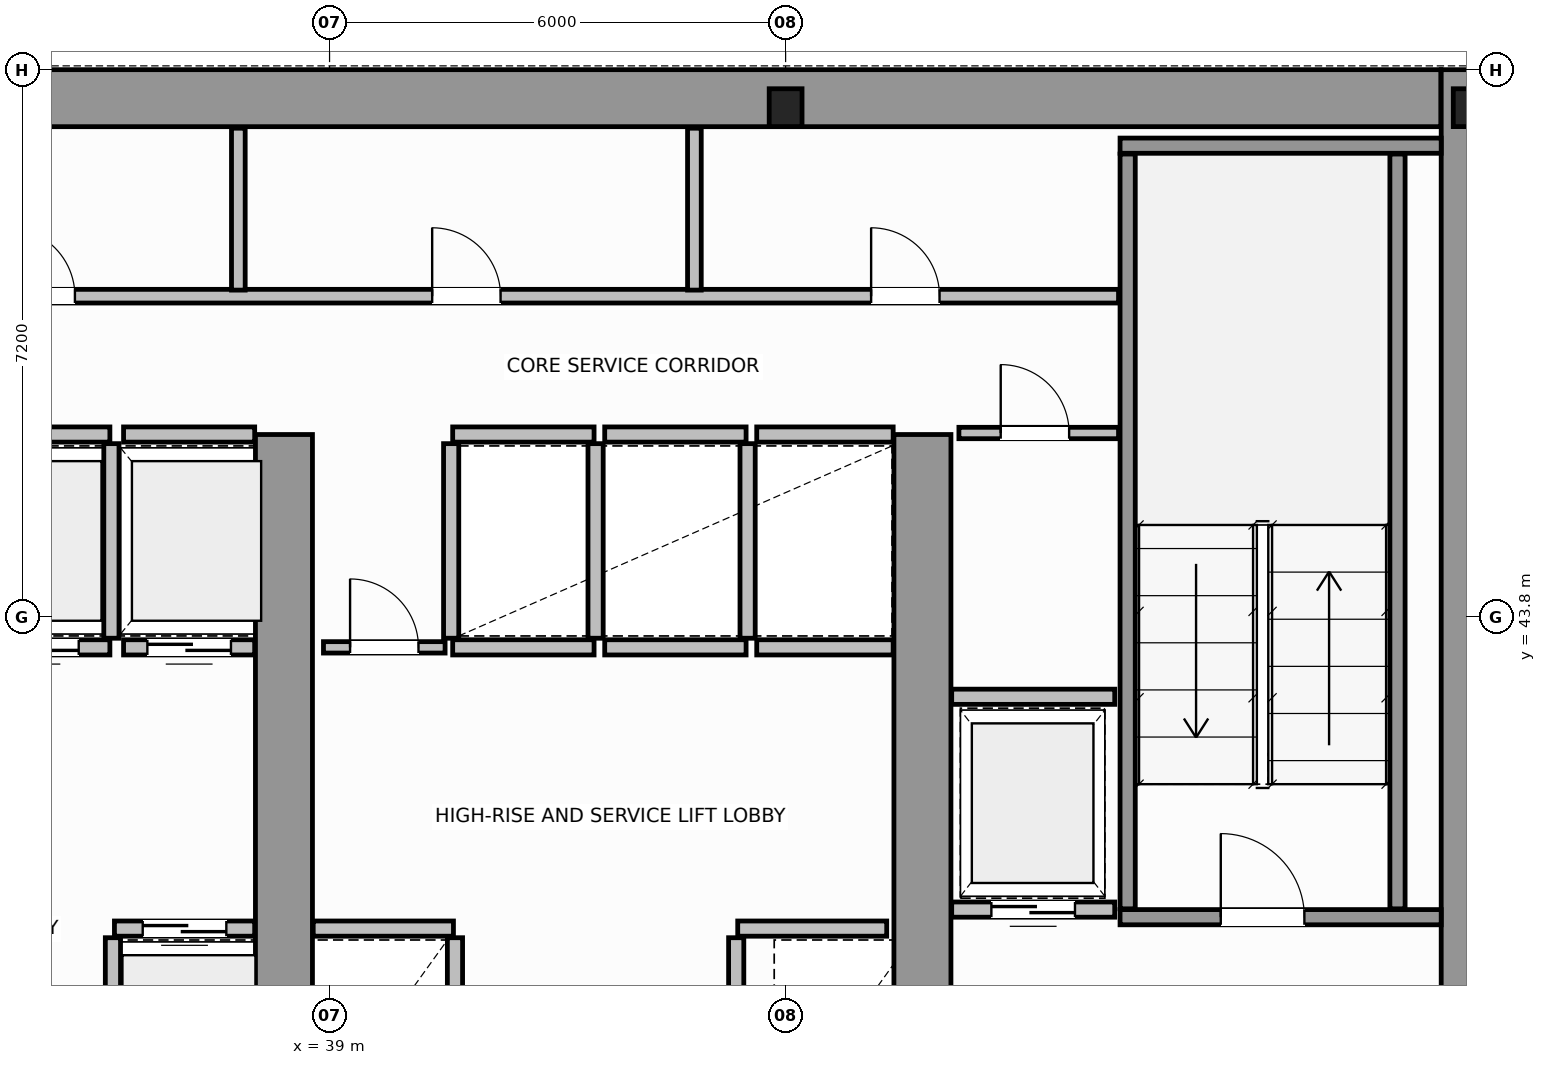
"""IFC4 building model, lengths in metres.
Left out: names, types, materials, properties, quantities, classifications, styles, units other than length and angle.
Written with IfcOpenShell. Run it as: python <this file> out.ifc"""

import sys

from ifc_helpers import new_model, si_unit, direction, frame, frame_2d, origin, origin_2d, place, context, subcontext, project, spatial, rectangle, i_section, extrude, source, transform, mapped, element, fill, save


model = new_model("IFC4")
c1 = context("Model", 3, precision=1e-05, world=origin(), true_north=direction((0.0, 1.0)))
c2 = subcontext(c1, "Body", "Model", "MODEL_VIEW")
j1 = project(units=[si_unit("LENGTHUNIT", "METRE"), si_unit("PLANEANGLEUNIT", "RADIAN")], contexts=[c1])
p1 = place(None, origin())
s1 = spatial("IfcSite", under=j1, at=p1, CompositionType="ELEMENT")
p2 = place(p1, origin())
s2 = spatial("IfcBuilding", under=s1, at=p2, CompositionType="ELEMENT")
p3 = place(p2, frame((0.0, 0.0, 141.4)))
s3 = spatial("IfcBuildingStorey", under=s2, at=p3, CompositionType="ELEMENT", Elevation=141.4)
m1 = source(origin(), c2, "Body", "SweptSolid", [
    extrude(i_section(OverallWidth=0.432, OverallDepth=0.498, WebThickness=0.055, FlangeThickness=0.068, FilletRadius=0.015, at=origin_2d()), origin(), (0.0, 0.0, 1.0), 3.8),
])
for number, where, z_axis, x_axis in (
    (1, (45.0, 50.5, 0.0), (0.0, 0.0, 1.0), (1.0, 0.0, 0.0)),
    (2, (54.0, 50.5, 0.0), (0.0, 0.0, 1.0), (1.0, 0.0, 0.0)),
):
    element("IfcColumn", number, at=place(p3, frame(where, z_axis=z_axis, x_axis=x_axis)), inside=s3, PredefinedType="COLUMN", context=c2, shape_type="MappedRepresentation", body=[
        mapped(m1, transform((0.0, 0.0, 0.0), scale=1.0)),
    ])
p4 = place(p3, frame((34.002, 50.625, 0.0), z_axis=(0.0, 0.0, 1.0), x_axis=(1.0, 0.0, 0.0)))
e3 = element("IfcWall", 3, at=p4, inside=s3, PredefinedType="SHEAR", context=c2, shape_type="SweptSolid", body=[
    extrude(rectangle(XDim=19.619, YDim=0.75, at=frame_2d((9.81, 0.0))), origin(), (0.0, 0.0, 1.0), 3.8),
])
p5 = place(p3, frame((54.0, 36.5, 0.0), z_axis=(0.0, 0.0, 1.0), x_axis=(0.0, 1.0, 0.0)))
e4 = element("IfcWall", 4, at=p5, inside=s3, PredefinedType="SHEAR", context=c2, shape_type="SweptSolid", body=[
    extrude(rectangle(XDim=14.5, YDim=0.75, at=frame_2d((7.25, 0.0))), origin(), (0.0, 0.0, 1.0), 3.8),
])
for number, where, z_axis, x_axis in (
    (5, (38.4, 36.895, 0.0), (0.0, 0.0, 1.0), (0.0, 1.0, 0.0)),
    (6, (46.8, 36.895, 0.0), (0.0, 0.0, 1.0), (0.0, 1.0, 0.0)),
):
    element("IfcWall", number, at=place(p3, frame(where, z_axis=z_axis, x_axis=x_axis)), inside=s3, PredefinedType="SHEAR", context=c2, shape_type="SweptSolid", body=[
        extrude(rectangle(XDim=9.305, YDim=0.75, at=frame_2d((4.652, 0.0))), origin(), (0.0, 0.0, 1.0), 3.8),
    ])
p6 = place(p3, frame((49.4, 39.85, 0.0), z_axis=(0.0, 0.0, 1.0), x_axis=(1.0, 0.0, 0.0)))
e7 = element("IfcWall", 7, at=p6, inside=s3, PredefinedType="SOLIDWALL", context=c2, shape_type="SweptSolid", body=[
    extrude(rectangle(XDim=4.225, YDim=0.2, at=frame_2d((2.113, 0.0))), origin(), (0.0, 0.0, 1.0), 3.8),
])
p7 = place(p6, frame((1.325, 0.0, 0.0)))
e8 = element("IfcOpeningElement", 8, at=p7, cuts=e7, PredefinedType="OPENING", context=c2, shape_type="SweptSolid", body=[
    extrude(rectangle(XDim=1.1, YDim=2.15, at=frame_2d((0.55, 1.075))), frame((0.0, 0.11, 0.0), z_axis=(0.0, -1.0, 0.0), x_axis=(1.0, 0.0, 0.0)), (0.0, 0.0, 1.0), 0.22),
])
p8 = place(p3, frame((49.4, 50.0, 0.0), z_axis=(0.0, 0.0, 1.0), x_axis=(1.0, 0.0, 0.0)))
e9 = element("IfcWall", 9, at=p8, inside=s3, PredefinedType="SOLIDWALL", context=c2, shape_type="SweptSolid", body=[
    extrude(rectangle(XDim=4.225, YDim=0.2, at=frame_2d((2.113, 0.0))), origin(), (0.0, 0.0, 1.0), 3.8),
])
for number, where, z_axis, x_axis in (
    (10, (49.5, 39.96, 0.0), (0.0, 0.0, 1.0), (0.0, 1.0, 0.0)),
    (11, (53.05, 39.96, 0.0), (0.0, 0.0, 1.0), (0.0, 1.0, 0.0)),
):
    element("IfcWall", number, at=place(p3, frame(where, z_axis=z_axis, x_axis=x_axis)), inside=s3, PredefinedType="SOLIDWALL", context=c2, shape_type="SweptSolid", body=[
        extrude(rectangle(XDim=9.93, YDim=0.2, at=frame_2d((4.965, 0.0))), origin(), (0.0, 0.0, 1.0), 3.8),
    ])
p9 = place(p3, frame((36.17, 39.7, 0.0), z_axis=(0.0, 0.0, 1.0), x_axis=(1.0, 0.0, 0.0)))
e12 = element("IfcWall", 12, at=p9, inside=s3, PredefinedType="SOLIDWALL", context=c2, shape_type="SweptSolid", body=[
    extrude(rectangle(XDim=1.845, YDim=0.2, at=frame_2d((0.922, 0.0))), origin(), (0.0, 0.0, 1.0), 3.58),
])
p10 = place(p9, frame((0.372, 0.0, 0.0)))
e13 = element("IfcOpeningElement", 13, at=p10, cuts=e12, PredefinedType="OPENING", context=c2, shape_type="SweptSolid", body=[
    extrude(rectangle(XDim=1.1, YDim=2.15, at=frame_2d((0.55, 1.075))), frame((0.0, 0.11, 0.0), z_axis=(0.0, -1.0, 0.0), x_axis=(1.0, 0.0, 0.0)), (0.0, 0.0, 1.0), 0.22),
])
p11 = place(p3, frame((36.15, 37.02, 0.0), z_axis=(0.0, 0.0, 1.0), x_axis=(0.0, 1.0, 0.0)))
e14 = element("IfcWall", 14, at=p11, inside=s3, PredefinedType="SOLIDWALL", context=c2, shape_type="SweptSolid", body=[
    extrude(rectangle(XDim=2.56, YDim=0.2, at=frame_2d((1.28, 0.0))), origin(), (0.0, 0.0, 1.0), 3.58),
])
p12 = place(p3, frame((34.19, 43.4, 0.0), z_axis=(0.0, 0.0, 1.0), x_axis=(1.0, 0.0, 0.0)))
e15 = element("IfcWall", 15, at=p12, inside=s3, PredefinedType="SOLIDWALL", context=c2, shape_type="SweptSolid", body=[
    extrude(rectangle(XDim=1.92, YDim=0.2, at=frame_2d((0.96, 0.0))), origin(), (0.0, 0.0, 1.0), 3.58),
])
p13 = place(p12, frame((0.41, 0.0, 0.0)))
e16 = element("IfcOpeningElement", 16, at=p13, cuts=e15, PredefinedType="OPENING", context=c2, shape_type="SweptSolid", body=[
    extrude(rectangle(XDim=1.1, YDim=2.15, at=frame_2d((0.55, 1.075))), frame((0.0, 0.11, 0.0), z_axis=(0.0, -1.0, 0.0), x_axis=(1.0, 0.0, 0.0)), (0.0, 0.0, 1.0), 0.22),
])
p14 = place(p3, frame((34.19, 46.2, 0.0), z_axis=(0.0, 0.0, 1.0), x_axis=(1.0, 0.0, 0.0)))
e17 = element("IfcWall", 17, at=p14, inside=s3, PredefinedType="SOLIDWALL", context=c2, shape_type="SweptSolid", body=[
    extrude(rectangle(XDim=1.92, YDim=0.2, at=frame_2d((0.96, 0.0))), origin(), (0.0, 0.0, 1.0), 3.58),
])
p15 = place(p3, frame((36.13, 43.52, 0.0), z_axis=(0.0, 0.0, 1.0), x_axis=(0.0, 1.0, 0.0)))
e18 = element("IfcWall", 18, at=p15, inside=s3, PredefinedType="SOLIDWALL", context=c2, shape_type="SweptSolid", body=[
    extrude(rectangle(XDim=2.56, YDim=0.2, at=frame_2d((1.28, 0.0))), origin(), (0.0, 0.0, 1.0), 3.58),
])
p16 = place(p3, frame((36.29, 43.4, 0.0), z_axis=(0.0, 0.0, 1.0), x_axis=(1.0, 0.0, 0.0)))
e19 = element("IfcWall", 19, at=p16, inside=s3, PredefinedType="SOLIDWALL", context=c2, shape_type="SweptSolid", body=[
    extrude(rectangle(XDim=1.725, YDim=0.2, at=frame_2d((0.862, 0.0))), origin(), (0.0, 0.0, 1.0), 3.58),
])
p17 = place(p16, frame((0.313, 0.0, 0.0)))
e20 = element("IfcOpeningElement", 20, at=p17, cuts=e19, PredefinedType="OPENING", context=c2, shape_type="SweptSolid", body=[
    extrude(rectangle(XDim=1.1, YDim=2.15, at=frame_2d((0.55, 1.075))), frame((0.0, 0.11, 0.0), z_axis=(0.0, -1.0, 0.0), x_axis=(1.0, 0.0, 0.0)), (0.0, 0.0, 1.0), 0.22),
])
p18 = place(p3, frame((36.29, 46.2, 0.0), z_axis=(0.0, 0.0, 1.0), x_axis=(1.0, 0.0, 0.0)))
e21 = element("IfcWall", 21, at=p18, inside=s3, PredefinedType="SOLIDWALL", context=c2, shape_type="SweptSolid", body=[
    extrude(rectangle(XDim=1.725, YDim=0.2, at=frame_2d((0.862, 0.0))), origin(), (0.0, 0.0, 1.0), 3.58),
])
p19 = place(p3, frame((38.785, 39.7, 0.0), z_axis=(0.0, 0.0, 1.0), x_axis=(1.0, 0.0, 0.0)))
e22 = element("IfcWall", 22, at=p19, inside=s3, PredefinedType="SOLIDWALL", context=c2, shape_type="SweptSolid", body=[
    extrude(rectangle(XDim=1.845, YDim=0.2, at=frame_2d((0.922, 0.0))), origin(), (0.0, 0.0, 1.0), 3.58),
])
p20 = place(p3, frame((40.65, 37.02, 0.0), z_axis=(0.0, 0.0, 1.0), x_axis=(0.0, 1.0, 0.0)))
e23 = element("IfcWall", 23, at=p20, inside=s3, PredefinedType="SOLIDWALL", context=c2, shape_type="SweptSolid", body=[
    extrude(rectangle(XDim=2.56, YDim=0.2, at=frame_2d((1.28, 0.0))), origin(), (0.0, 0.0, 1.0), 3.58),
])
p21 = place(p3, frame((44.37, 39.7, 0.0), z_axis=(0.0, 0.0, 1.0), x_axis=(1.0, 0.0, 0.0)))
e24 = element("IfcWall", 24, at=p21, inside=s3, PredefinedType="SOLIDWALL", context=c2, shape_type="SweptSolid", body=[
    extrude(rectangle(XDim=1.96, YDim=0.2, at=frame_2d((0.98, 0.0))), origin(), (0.0, 0.0, 1.0), 3.58),
])
p22 = place(p3, frame((44.35, 37.02, 0.0), z_axis=(0.0, 0.0, 1.0), x_axis=(0.0, 1.0, 0.0)))
e25 = element("IfcWall", 25, at=p22, inside=s3, PredefinedType="SOLIDWALL", context=c2, shape_type="SweptSolid", body=[
    extrude(rectangle(XDim=2.56, YDim=0.2, at=frame_2d((1.28, 0.0))), origin(), (0.0, 0.0, 1.0), 3.58),
])
for number, where, z_axis, x_axis in (
    (26, (40.62, 43.4, 0.0), (0.0, 0.0, 1.0), (1.0, 0.0, 0.0)),
    (27, (40.62, 46.2, 0.0), (0.0, 0.0, 1.0), (1.0, 0.0, 0.0)),
):
    element("IfcWall", number, at=place(p3, frame(where, z_axis=z_axis, x_axis=x_axis)), inside=s3, PredefinedType="SOLIDWALL", context=c2, shape_type="SweptSolid", body=[
        extrude(rectangle(XDim=1.86, YDim=0.2, at=frame_2d((0.93, 0.0))), origin(), (0.0, 0.0, 1.0), 3.58),
    ])
for number, where, z_axis, x_axis in (
    (28, (40.6, 43.52, 0.0), (0.0, 0.0, 1.0), (0.0, 1.0, 0.0)),
    (29, (42.5, 43.52, 0.0), (0.0, 0.0, 1.0), (0.0, 1.0, 0.0)),
):
    element("IfcWall", number, at=place(p3, frame(where, z_axis=z_axis, x_axis=x_axis)), inside=s3, PredefinedType="SOLIDWALL", context=c2, shape_type="SweptSolid", body=[
        extrude(rectangle(XDim=2.56, YDim=0.2, at=frame_2d((1.28, 0.0))), origin(), (0.0, 0.0, 1.0), 3.58),
    ])
for number, where, z_axis, x_axis in (
    (30, (42.62, 43.4, 0.0), (0.0, 0.0, 1.0), (1.0, 0.0, 0.0)),
    (31, (42.62, 46.2, 0.0), (0.0, 0.0, 1.0), (1.0, 0.0, 0.0)),
):
    element("IfcWall", number, at=place(p3, frame(where, z_axis=z_axis, x_axis=x_axis)), inside=s3, PredefinedType="SOLIDWALL", context=c2, shape_type="SweptSolid", body=[
        extrude(rectangle(XDim=1.86, YDim=0.2, at=frame_2d((0.93, 0.0))), origin(), (0.0, 0.0, 1.0), 3.58),
    ])
p23 = place(p3, frame((44.5, 43.52, 0.0), z_axis=(0.0, 0.0, 1.0), x_axis=(0.0, 1.0, 0.0)))
e32 = element("IfcWall", 32, at=p23, inside=s3, PredefinedType="SOLIDWALL", context=c2, shape_type="SweptSolid", body=[
    extrude(rectangle(XDim=2.56, YDim=0.2, at=frame_2d((1.28, 0.0))), origin(), (0.0, 0.0, 1.0), 3.58),
])
for number, where, z_axis, x_axis in (
    (33, (44.62, 43.4, 0.0), (0.0, 0.0, 1.0), (1.0, 0.0, 0.0)),
    (34, (44.62, 46.2, 0.0), (0.0, 0.0, 1.0), (1.0, 0.0, 0.0)),
):
    element("IfcWall", number, at=place(p3, frame(where, z_axis=z_axis, x_axis=x_axis)), inside=s3, PredefinedType="SOLIDWALL", context=c2, shape_type="SweptSolid", body=[
        extrude(rectangle(XDim=1.795, YDim=0.2, at=frame_2d((0.897, 0.0))), origin(), (0.0, 0.0, 1.0), 3.58),
    ])
p24 = place(p3, frame((47.185, 39.95, 0.0), z_axis=(0.0, 0.0, 1.0), x_axis=(1.0, 0.0, 0.0)))
e35 = element("IfcWall", 35, at=p24, inside=s3, PredefinedType="SOLIDWALL", context=c2, shape_type="SweptSolid", body=[
    extrude(rectangle(XDim=2.145, YDim=0.2, at=frame_2d((1.073, 0.0))), origin(), (0.0, 0.0, 1.0), 3.58),
])
p25 = place(p24, frame((0.522, 0.0, 0.0)))
e36 = element("IfcOpeningElement", 36, at=p25, cuts=e35, PredefinedType="OPENING", context=c2, shape_type="SweptSolid", body=[
    extrude(rectangle(XDim=1.1, YDim=2.15, at=frame_2d((0.55, 1.075))), frame((0.0, 0.11, 0.0), z_axis=(0.0, -1.0, 0.0), x_axis=(1.0, 0.0, 0.0)), (0.0, 0.0, 1.0), 0.22),
])
p26 = place(p3, frame((47.185, 42.75, 0.0), z_axis=(0.0, 0.0, 1.0), x_axis=(1.0, 0.0, 0.0)))
e37 = element("IfcWall", 37, at=p26, inside=s3, PredefinedType="SOLIDWALL", context=c2, shape_type="SweptSolid", body=[
    extrude(rectangle(XDim=2.145, YDim=0.2, at=frame_2d((1.073, 0.0))), origin(), (0.0, 0.0, 1.0), 3.58),
])
p27 = place(p3, frame((47.28, 46.22, 0.0), z_axis=(0.0, 0.0, 1.0), x_axis=(1.0, 0.0, 0.0)))
e38 = element("IfcWall", 38, at=p27, inside=s3, PredefinedType="PARTITIONING", context=c2, shape_type="SweptSolid", body=[
    extrude(rectangle(XDim=2.1, YDim=0.15, at=frame_2d((1.05, 0.0))), origin(), (0.0, 0.0, 1.0), 3.58),
])
p28 = place(p27, frame((0.55, 0.0, 0.0)))
e39 = element("IfcOpeningElement", 39, at=p28, cuts=e38, PredefinedType="OPENING", context=c2, shape_type="SweptSolid", body=[
    extrude(rectangle(XDim=0.9, YDim=2.1, at=frame_2d((0.45, 1.05))), frame((0.0, 0.085, 0.0), z_axis=(0.0, -1.0, 0.0), x_axis=(1.0, 0.0, 0.0)), (0.0, 0.0, 1.0), 0.17),
])
p29 = place(p3, frame((38.92, 43.4, 0.0), z_axis=(0.0, 0.0, 1.0), x_axis=(1.0, 0.0, 0.0)))
e40 = element("IfcWall", 40, at=p29, inside=s3, PredefinedType="PARTITIONING", context=c2, shape_type="SweptSolid", body=[
    extrude(rectangle(XDim=1.6, YDim=0.15, at=frame_2d((0.8, 0.0))), origin(), (0.0, 0.0, 1.0), 3.58),
])
p30 = place(p29, frame((0.35, 0.0, 0.0)))
e41 = element("IfcOpeningElement", 41, at=p30, cuts=e40, PredefinedType="OPENING", context=c2, shape_type="SweptSolid", body=[
    extrude(rectangle(XDim=0.9, YDim=2.1, at=frame_2d((0.45, 1.05))), frame((0.0, 0.085, 0.0), z_axis=(0.0, -1.0, 0.0), x_axis=(1.0, 0.0, 0.0)), (0.0, 0.0, 1.0), 0.17),
])
p31 = place(p3, frame((18.62, 48.02, 0.0), z_axis=(0.0, 0.0, 1.0), x_axis=(1.0, 0.0, 0.0)))
e42 = element("IfcWall", 42, at=p31, inside=s3, PredefinedType="PLUMBINGWALL", context=c2, shape_type="SweptSolid", body=[
    extrude(rectangle(XDim=30.76, YDim=0.18, at=frame_2d((15.38, 0.0))), origin(), (0.0, 0.0, 1.0), 3.58),
])
p32 = place(p31, frame((1.655, 0.0, 0.0)))
e43 = element("IfcOpeningElement", 43, at=p32, cuts=e42, PredefinedType="OPENING", context=c2, shape_type="SweptSolid", body=[
    extrude(rectangle(XDim=0.9, YDim=2.15, at=frame_2d((0.45, 1.075))), frame((0.0, 0.1, 0.0), z_axis=(0.0, -1.0, 0.0), x_axis=(1.0, 0.0, 0.0)), (0.0, 0.0, 1.0), 0.2),
])
p33 = place(p31, frame((6.03, 0.0, 0.0)))
e44 = element("IfcOpeningElement", 44, at=p33, cuts=e42, PredefinedType="OPENING", context=c2, shape_type="SweptSolid", body=[
    extrude(rectangle(XDim=0.9, YDim=2.15, at=frame_2d((0.45, 1.075))), frame((0.0, 0.1, 0.0), z_axis=(0.0, -1.0, 0.0), x_axis=(1.0, 0.0, 0.0)), (0.0, 0.0, 1.0), 0.2),
])
p34 = place(p31, frame((10.93, 0.0, 0.0)))
e45 = element("IfcOpeningElement", 45, at=p34, cuts=e42, PredefinedType="OPENING", context=c2, shape_type="SweptSolid", body=[
    extrude(rectangle(XDim=0.9, YDim=2.15, at=frame_2d((0.45, 1.075))), frame((0.0, 0.1, 0.0), z_axis=(0.0, -1.0, 0.0), x_axis=(1.0, 0.0, 0.0)), (0.0, 0.0, 1.0), 0.2),
])
p35 = place(p31, frame((16.13, 0.0, 0.0)))
e46 = element("IfcOpeningElement", 46, at=p35, cuts=e42, PredefinedType="OPENING", context=c2, shape_type="SweptSolid", body=[
    extrude(rectangle(XDim=0.9, YDim=2.15, at=frame_2d((0.45, 1.075))), frame((0.0, 0.1, 0.0), z_axis=(0.0, -1.0, 0.0), x_axis=(1.0, 0.0, 0.0)), (0.0, 0.0, 1.0), 0.2),
])
p36 = place(p31, frame((21.73, 0.0, 0.0)))
e47 = element("IfcOpeningElement", 47, at=p36, cuts=e42, PredefinedType="OPENING", context=c2, shape_type="SweptSolid", body=[
    extrude(rectangle(XDim=0.9, YDim=2.15, at=frame_2d((0.45, 1.075))), frame((0.0, 0.1, 0.0), z_axis=(0.0, -1.0, 0.0), x_axis=(1.0, 0.0, 0.0)), (0.0, 0.0, 1.0), 0.2),
])
p37 = place(p31, frame((27.505, 0.0, 0.0)))
e48 = element("IfcOpeningElement", 48, at=p37, cuts=e42, PredefinedType="OPENING", context=c2, shape_type="SweptSolid", body=[
    extrude(rectangle(XDim=0.9, YDim=2.15, at=frame_2d((0.45, 1.075))), frame((0.0, 0.1, 0.0), z_axis=(0.0, -1.0, 0.0), x_axis=(1.0, 0.0, 0.0)), (0.0, 0.0, 1.0), 0.2),
])
for number, where, z_axis, x_axis in (
    (49, (37.8, 48.1, 0.0), (0.0, 0.0, 1.0), (0.0, 1.0, 0.0)),
    (50, (43.8, 48.1, 0.0), (0.0, 0.0, 1.0), (0.0, 1.0, 0.0)),
):
    element("IfcWall", number, at=place(p3, frame(where, z_axis=z_axis, x_axis=x_axis)), inside=s3, PredefinedType="PLUMBINGWALL", context=c2, shape_type="SweptSolid", body=[
        extrude(rectangle(XDim=2.13, YDim=0.18, at=frame_2d((1.065, 0.0))), origin(), (0.0, 0.0, 1.0), 3.58),
    ])
m2 = source(origin(), c2, "Body", "SweptSolid", [
    extrude(rectangle(XDim=1.1, YDim=2.15, at=frame_2d((0.55, 1.075))), frame((0.0, 0.025, 0.0), z_axis=(0.0, -1.0, 0.0), x_axis=(1.0, 0.0, 0.0)), (0.0, 0.0, 1.0), 0.05),
])
p38 = place(p7, origin())
e51 = element("IfcDoor", 51, at=p38, inside=s3, OperationType="SINGLE_SWING_RIGHT", PredefinedType="DOOR", context=c2, shape_type="MappedRepresentation", body=[
    mapped(m2, transform((0.0, 0.0, 0.0), scale=1.0)),
])
fill(e8, e51)
p39 = place(p10, origin())
e52 = element("IfcDoor", 52, at=p39, inside=s3, OperationType="DOUBLE_DOOR_SLIDING", PredefinedType="DOOR", context=c2, shape_type="MappedRepresentation", body=[
    mapped(m2, transform((0.0, 0.0, 0.0), scale=1.0)),
])
fill(e13, e52)
p40 = place(p13, origin())
e53 = element("IfcDoor", 53, at=p40, inside=s3, OperationType="DOUBLE_DOOR_SLIDING", PredefinedType="DOOR", context=c2, shape_type="MappedRepresentation", body=[
    mapped(m2, transform((0.0, 0.0, 0.0), scale=1.0)),
])
fill(e16, e53)
p41 = place(p17, origin())
e54 = element("IfcDoor", 54, at=p41, inside=s3, OperationType="DOUBLE_DOOR_SLIDING", PredefinedType="DOOR", context=c2, shape_type="MappedRepresentation", body=[
    mapped(m2, transform((0.0, 0.0, 0.0), scale=1.0)),
])
fill(e20, e54)
p42 = place(p25, origin())
e55 = element("IfcDoor", 55, at=p42, inside=s3, OperationType="DOUBLE_DOOR_SLIDING", PredefinedType="DOOR", context=c2, shape_type="MappedRepresentation", body=[
    mapped(m2, transform((0.0, 0.0, 0.0), scale=1.0)),
])
fill(e36, e55)
m3 = source(origin(), c2, "Body", "SweptSolid", [
    extrude(rectangle(XDim=0.9, YDim=2.1, at=frame_2d((0.45, 1.05))), frame((0.0, 0.025, 0.0), z_axis=(0.0, -1.0, 0.0), x_axis=(1.0, 0.0, 0.0)), (0.0, 0.0, 1.0), 0.05),
])
p43 = place(p28, origin())
e56 = element("IfcDoor", 56, at=p43, inside=s3, OperationType="SINGLE_SWING_RIGHT", PredefinedType="DOOR", context=c2, shape_type="MappedRepresentation", body=[
    mapped(m3, transform((0.0, 0.0, 0.0), scale=1.0)),
])
fill(e39, e56)
p44 = place(p30, origin())
e57 = element("IfcDoor", 57, at=p44, inside=s3, OperationType="SINGLE_SWING_LEFT", PredefinedType="DOOR", context=c2, shape_type="MappedRepresentation", body=[
    mapped(m3, transform((0.0, 0.0, 0.0), scale=1.0)),
])
fill(e41, e57)
m4 = source(origin(), c2, "Body", "SweptSolid", [
    extrude(rectangle(XDim=0.9, YDim=2.15, at=frame_2d((0.45, 1.075))), frame((0.0, 0.025, 0.0), z_axis=(0.0, -1.0, 0.0), x_axis=(1.0, 0.0, 0.0)), (0.0, 0.0, 1.0), 0.05),
])
p45 = place(p35, origin())
e58 = element("IfcDoor", 58, at=p45, inside=s3, OperationType="SINGLE_SWING_RIGHT", PredefinedType="DOOR", context=c2, shape_type="MappedRepresentation", body=[
    mapped(m4, transform((0.0, 0.0, 0.0), scale=1.0)),
])
fill(e46, e58)
p46 = place(p36, origin())
e59 = element("IfcDoor", 59, at=p46, inside=s3, OperationType="SINGLE_SWING_LEFT", PredefinedType="DOOR", context=c2, shape_type="MappedRepresentation", body=[
    mapped(m4, transform((0.0, 0.0, 0.0), scale=1.0)),
])
fill(e47, e59)
p47 = place(p37, origin())
e60 = element("IfcDoor", 60, at=p47, inside=s3, OperationType="SINGLE_SWING_RIGHT", PredefinedType="DOOR", context=c2, shape_type="MappedRepresentation", body=[
    mapped(m4, transform((0.0, 0.0, 0.0), scale=1.0)),
])
fill(e48, e60)
save(model, sys.argv[1])
